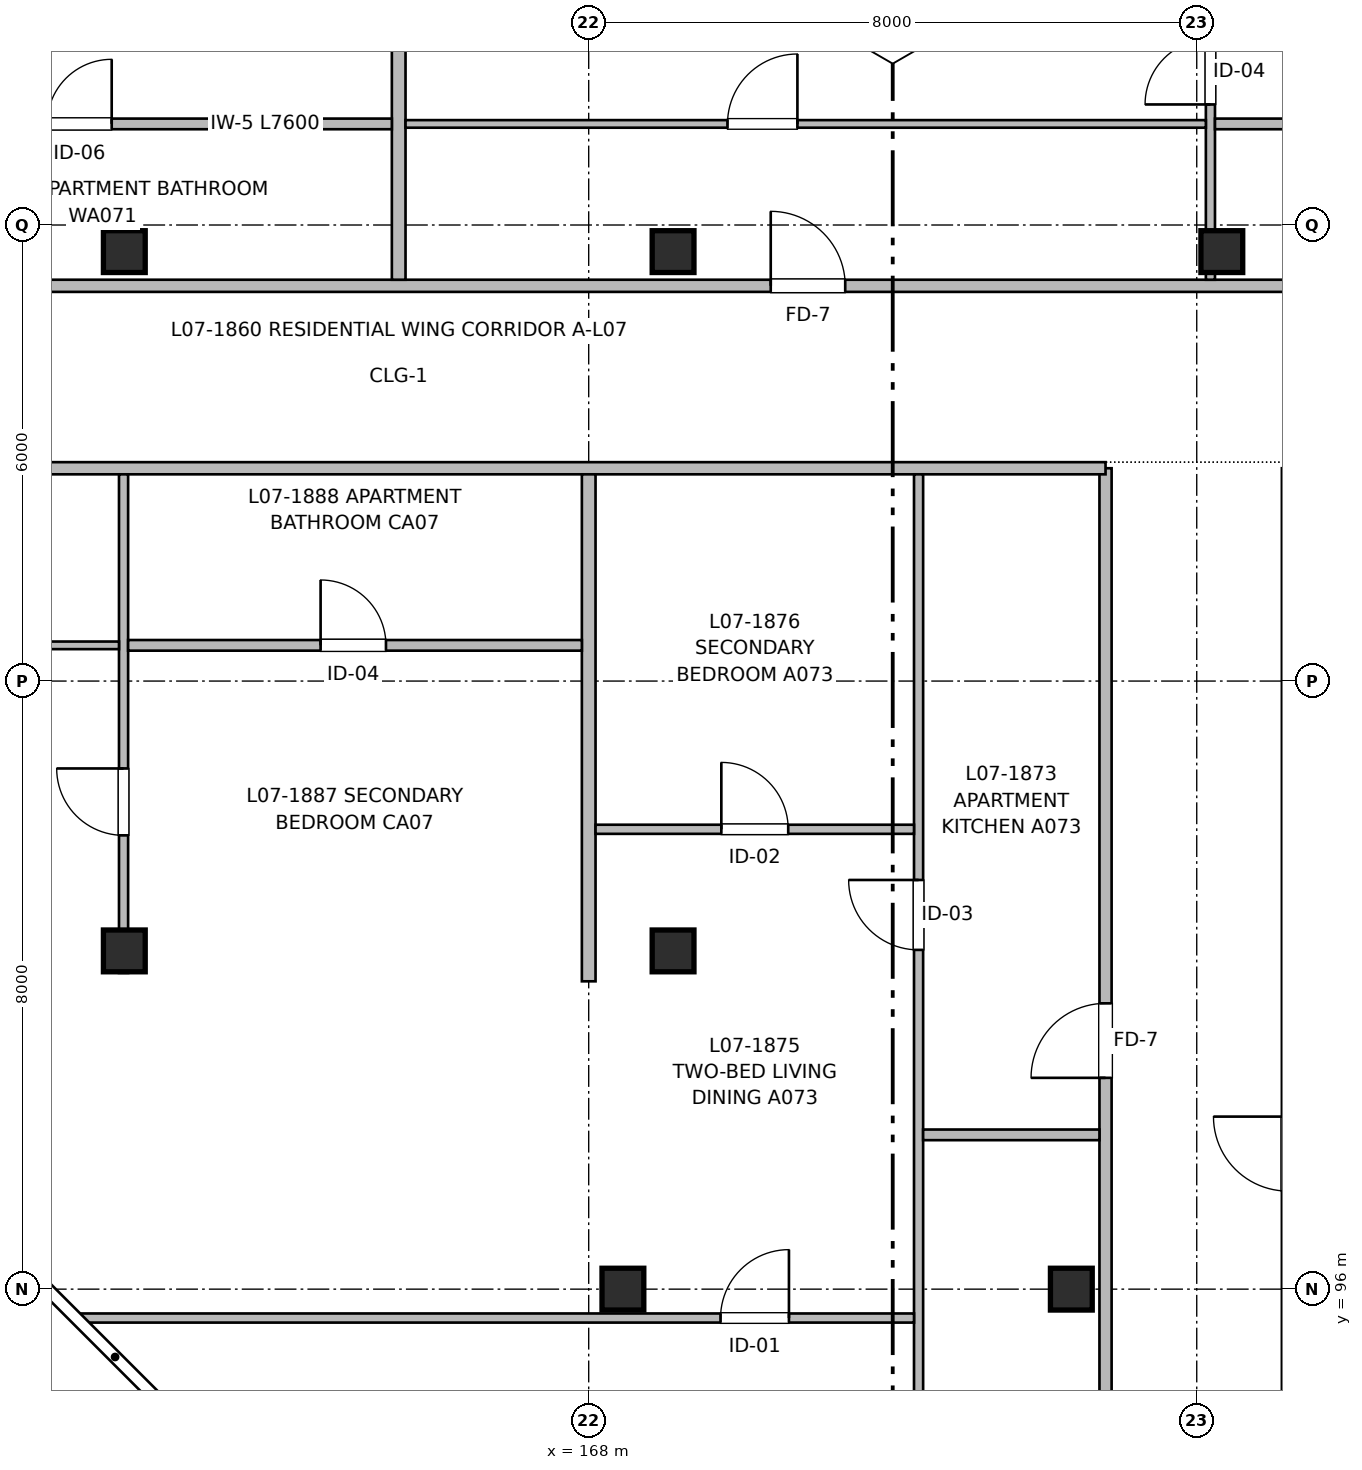
"""IFC4 building model, lengths in metres.
Left out: names, types, materials, properties, quantities, classifications, styles, units other than length and angle.
Written with IfcOpenShell. Run it as: python <this file> out.ifc"""

import sys

from ifc_helpers import new_model, si_unit, direction, frame, frame_2d, origin, origin_2d, place, context, subcontext, project, spatial, rectangle, extrude, element, fill, save


model = new_model("IFC4")
c1 = context("Model", 3, precision=1e-05, world=origin(), true_north=direction((0.0, 1.0)))
c2 = subcontext(c1, "Body", "Model", "MODEL_VIEW")
j1 = project(units=[si_unit("LENGTHUNIT", "METRE"), si_unit("PLANEANGLEUNIT", "RADIAN")], contexts=[c1])
p1 = place(None, origin())
s1 = spatial("IfcSite", under=j1, at=p1, CompositionType="ELEMENT")
p2 = place(p1, origin())
s2 = spatial("IfcBuilding", under=s1, at=p2, CompositionType="ELEMENT")
p3 = place(p2, frame((0.0, 0.0, 23.36)))
s3 = spatial("IfcBuildingStorey", under=s2, at=p3, CompositionType="ELEMENT", Elevation=23.36)
for number, where, z_axis, x_axis in (
    (1, (161.89, 100.45, 0.0), (0.0, 0.0, 1.0), (1.0, 0.0, 0.0)),
    (2, (161.89, 109.65, 0.0), (0.0, 0.0, 1.0), (1.0, 0.0, 0.0)),
    (3, (168.45, 96.0, 0.0), (0.0, 0.0, 1.0), (1.0, 0.0, 0.0)),
    (4, (169.11, 100.45, 0.0), (0.0, 0.0, 1.0), (1.0, 0.0, 0.0)),
    (5, (169.11, 109.65, 0.0), (0.0, 0.0, 1.0), (1.0, 0.0, 0.0)),
    (6, (174.35, 96.0, 0.0), (0.0, 0.0, 1.0), (1.0, 0.0, 0.0)),
    (7, (176.33, 109.65, 0.0), (0.0, 0.0, 1.0), (1.0, 0.0, 0.0)),
):
    element("IfcColumn", number, at=place(p3, frame(where, z_axis=z_axis, x_axis=x_axis)), inside=s3, PredefinedType="COLUMN", context=c2, shape_type="SweptSolid", body=[
        extrude(rectangle(XDim=0.55, YDim=0.55, at=origin_2d()), origin(), (0.0, 0.0, 1.0), 3.2),
    ])
p4 = place(p3, frame((174.8, 56.16, 0.0), z_axis=(0.0, 0.0, 1.0), x_axis=(0.0, 1.0, 0.0)))
e8 = element("IfcWall", 8, at=p4, inside=s3, PredefinedType="PARTITIONING", context=c2, shape_type="SweptSolid", body=[
    extrude(rectangle(XDim=50.64, YDim=0.16, at=frame_2d((25.32, 0.0))), origin(), (0.0, 0.0, 1.0), 2.935),
])
p5 = place(p4, frame((8.62, 0.0, 0.0)))
e9 = element("IfcOpeningElement", 9, at=p5, cuts=e8, PredefinedType="OPENING", context=c2, shape_type="SweptSolid", body=[
    extrude(rectangle(XDim=0.98, YDim=2.15, at=frame_2d((0.49, 1.075))), frame((0.0, 0.09, 0.0), z_axis=(0.0, -1.0, 0.0), x_axis=(1.0, 0.0, 0.0)), (0.0, 0.0, 1.0), 0.18),
])
p6 = place(p4, frame((25.85, 0.0, 0.0)))
e10 = element("IfcOpeningElement", 10, at=p6, cuts=e8, PredefinedType="OPENING", context=c2, shape_type="SweptSolid", body=[
    extrude(rectangle(XDim=1.02, YDim=2.15, at=frame_2d((0.51, 1.075))), frame((0.0, 0.09, 0.0), z_axis=(0.0, -1.0, 0.0), x_axis=(1.0, 0.0, 0.0)), (0.0, 0.0, 1.0), 0.18),
])
p7 = place(p4, frame((42.62, 0.0, 0.0)))
e11 = element("IfcOpeningElement", 11, at=p7, cuts=e8, PredefinedType="OPENING", context=c2, shape_type="SweptSolid", body=[
    extrude(rectangle(XDim=0.98, YDim=2.15, at=frame_2d((0.49, 1.075))), frame((0.0, 0.09, 0.0), z_axis=(0.0, -1.0, 0.0), x_axis=(1.0, 0.0, 0.0)), (0.0, 0.0, 1.0), 0.18),
])
p8 = place(p3, frame((177.2, 56.16, 0.0), z_axis=(0.0, 0.0, 1.0), x_axis=(0.0, 1.0, 0.0)))
e12 = element("IfcWall", 12, at=p8, inside=s3, PredefinedType="PARTITIONING", context=c2, shape_type="SweptSolid", body=[
    extrude(rectangle(XDim=50.64, YDim=0.16, at=frame_2d((25.32, 0.0))), origin(), (0.0, 0.0, 1.0), 2.935),
])
p9 = place(p8, frame((12.84, 0.0, 0.0)))
e13 = element("IfcOpeningElement", 13, at=p9, cuts=e12, PredefinedType="OPENING", context=c2, shape_type="SweptSolid", body=[
    extrude(rectangle(XDim=1.1, YDim=2.15, at=frame_2d((0.55, 1.075))), frame((0.0, 0.09, 0.0), z_axis=(0.0, -1.0, 0.0), x_axis=(1.0, 0.0, 0.0)), (0.0, 0.0, 1.0), 0.18),
])
p10 = place(p8, frame((19.24, 0.0, 0.0)))
e14 = element("IfcOpeningElement", 14, at=p10, cuts=e12, PredefinedType="OPENING", context=c2, shape_type="SweptSolid", body=[
    extrude(rectangle(XDim=1.6, YDim=2.15, at=frame_2d((0.8, 1.075))), frame((0.0, 0.09, 0.0), z_axis=(0.0, -1.0, 0.0), x_axis=(1.0, 0.0, 0.0)), (0.0, 0.0, 1.0), 0.18),
])
p11 = place(p8, frame((1.8, 0.0, 0.0)))
e15 = element("IfcOpeningElement", 15, at=p11, cuts=e12, PredefinedType="OPENING", context=c2, shape_type="SweptSolid", body=[
    extrude(rectangle(XDim=0.96, YDim=2.15, at=frame_2d((0.48, 1.075))), frame((0.0, 0.09, 0.0), z_axis=(0.0, -1.0, 0.0), x_axis=(1.0, 0.0, 0.0)), (0.0, 0.0, 1.0), 0.18),
])
p12 = place(p8, frame((32.87, 0.0, 0.0)))
e16 = element("IfcOpeningElement", 16, at=p12, cuts=e12, PredefinedType="OPENING", context=c2, shape_type="SweptSolid", body=[
    extrude(rectangle(XDim=0.98, YDim=2.15, at=frame_2d((0.49, 1.075))), frame((0.0, 0.09, 0.0), z_axis=(0.0, -1.0, 0.0), x_axis=(1.0, 0.0, 0.0)), (0.0, 0.0, 1.0), 0.18),
])
p13 = place(p8, frame((41.13, 0.0, 0.0)))
e17 = element("IfcOpeningElement", 17, at=p13, cuts=e12, PredefinedType="OPENING", context=c2, shape_type="SweptSolid", body=[
    extrude(rectangle(XDim=0.98, YDim=2.15, at=frame_2d((0.49, 1.075))), frame((0.0, 0.09, 0.0), z_axis=(0.0, -1.0, 0.0), x_axis=(1.0, 0.0, 0.0)), (0.0, 0.0, 1.0), 0.18),
])
p14 = place(p3, frame((147.16, 106.8, 0.0), z_axis=(0.0, 0.0, 1.0), x_axis=(1.0, 0.0, 0.0)))
e18 = element("IfcWall", 18, at=p14, inside=s3, PredefinedType="PARTITIONING", context=c2, shape_type="SweptSolid", body=[
    extrude(rectangle(XDim=27.64, YDim=0.16, at=frame_2d((13.82, 0.0))), origin(), (0.0, 0.0, 1.0), 2.935),
])
p15 = place(p14, frame((3.515, 0.0, 0.0)))
e19 = element("IfcOpeningElement", 19, at=p15, cuts=e18, PredefinedType="OPENING", context=c2, shape_type="SweptSolid", body=[
    extrude(rectangle(XDim=1.05, YDim=2.15, at=frame_2d((0.525, 1.075))), frame((0.0, 0.09, 0.0), z_axis=(0.0, -1.0, 0.0), x_axis=(1.0, 0.0, 0.0)), (0.0, 0.0, 1.0), 0.18),
])
p16 = place(p14, frame((10.69, 0.0, 0.0)))
e20 = element("IfcOpeningElement", 20, at=p16, cuts=e18, PredefinedType="OPENING", context=c2, shape_type="SweptSolid", body=[
    extrude(rectangle(XDim=0.98, YDim=2.15, at=frame_2d((0.49, 1.075))), frame((0.0, 0.09, 0.0), z_axis=(0.0, -1.0, 0.0), x_axis=(1.0, 0.0, 0.0)), (0.0, 0.0, 1.0), 0.18),
])
p17 = place(p3, frame((147.16, 109.2, 0.0), z_axis=(0.0, 0.0, 1.0), x_axis=(1.0, 0.0, 0.0)))
e21 = element("IfcWall", 21, at=p17, inside=s3, PredefinedType="PARTITIONING", context=c2, shape_type="SweptSolid", body=[
    extrude(rectangle(XDim=36.68, YDim=0.16, at=frame_2d((18.34, 0.0))), origin(), (0.0, 0.0, 1.0), 2.935),
])
p18 = place(p17, frame((4.805, 0.0, 0.0)))
e22 = element("IfcOpeningElement", 22, at=p18, cuts=e21, PredefinedType="OPENING", context=c2, shape_type="SweptSolid", body=[
    extrude(rectangle(XDim=0.98, YDim=2.15, at=frame_2d((0.49, 1.075))), frame((0.0, 0.09, 0.0), z_axis=(0.0, -1.0, 0.0), x_axis=(1.0, 0.0, 0.0)), (0.0, 0.0, 1.0), 0.18),
])
p19 = place(p17, frame((23.235, 0.0, 0.0)))
e23 = element("IfcOpeningElement", 23, at=p19, cuts=e21, PredefinedType="OPENING", context=c2, shape_type="SweptSolid", body=[
    extrude(rectangle(XDim=0.98, YDim=2.15, at=frame_2d((0.49, 1.075))), frame((0.0, 0.09, 0.0), z_axis=(0.0, -1.0, 0.0), x_axis=(1.0, 0.0, 0.0)), (0.0, 0.0, 1.0), 0.18),
])
p20 = place(p3, frame((168.0, 100.05, 0.0), z_axis=(0.0, 0.0, 1.0), x_axis=(0.0, 1.0, 0.0)))
e24 = element("IfcWall", 24, at=p20, inside=s3, PredefinedType="PARTITIONING", context=c2, shape_type="SweptSolid", body=[
    extrude(rectangle(XDim=6.67, YDim=0.18, at=frame_2d((3.335, 0.0))), origin(), (0.0, 0.0, 1.0), 2.935),
])
p21 = place(p3, frame((172.34, 90.63, 0.0), z_axis=(0.0, 0.0, 1.0), x_axis=(0.0, 1.0, 0.0)))
e25 = element("IfcWall", 25, at=p21, inside=s3, PredefinedType="PARTITIONING", context=c2, shape_type="SweptSolid", body=[
    extrude(rectangle(XDim=16.09, YDim=0.12, at=frame_2d((8.045, 0.0))), origin(), (0.0, 0.0, 1.0), 2.935),
])
p22 = place(p21, frame((2.812, 0.0, 0.0)))
e26 = element("IfcOpeningElement", 26, at=p22, cuts=e25, PredefinedType="OPENING", context=c2, shape_type="SweptSolid", body=[
    extrude(rectangle(XDim=0.86, YDim=2.1, at=frame_2d((0.43, 1.05))), frame((0.0, 0.07, 0.0), z_axis=(0.0, -1.0, 0.0), x_axis=(1.0, 0.0, 0.0)), (0.0, 0.0, 1.0), 0.14),
])
p23 = place(p21, frame((9.833, 0.0, 0.0)))
e27 = element("IfcOpeningElement", 27, at=p23, cuts=e25, PredefinedType="OPENING", context=c2, shape_type="SweptSolid", body=[
    extrude(rectangle(XDim=0.92, YDim=2.1, at=frame_2d((0.46, 1.05))), frame((0.0, 0.07, 0.0), z_axis=(0.0, -1.0, 0.0), x_axis=(1.0, 0.0, 0.0)), (0.0, 0.0, 1.0), 0.14),
])
p24 = place(p3, frame((172.4, 98.03, 0.0), z_axis=(0.0, 0.0, 1.0), x_axis=(1.0, 0.0, 0.0)))
e28 = element("IfcWall", 28, at=p24, inside=s3, PredefinedType="PARTITIONING", context=c2, shape_type="SweptSolid", body=[
    extrude(rectangle(XDim=2.32, YDim=0.14, at=frame_2d((1.16, 0.0))), origin(), (0.0, 0.0, 1.0), 2.935),
])
p25 = place(p3, frame((161.312, 95.62, 0.0), z_axis=(0.0, 0.0, 1.0), x_axis=(1.0, 0.0, 0.0)))
e29 = element("IfcWall", 29, at=p25, inside=s3, PredefinedType="PARTITIONING", context=c2, shape_type="SweptSolid", body=[
    extrude(rectangle(XDim=10.968, YDim=0.12, at=frame_2d((5.484, 0.0))), origin(), (0.0, 0.0, 1.0), 2.935),
])
p26 = place(p25, frame((8.422, 0.0, 0.0)))
e30 = element("IfcOpeningElement", 30, at=p26, cuts=e29, PredefinedType="OPENING", context=c2, shape_type="SweptSolid", body=[
    extrude(rectangle(XDim=0.9, YDim=2.1, at=frame_2d((0.45, 1.05))), frame((0.0, 0.07, 0.0), z_axis=(0.0, -1.0, 0.0), x_axis=(1.0, 0.0, 0.0)), (0.0, 0.0, 1.0), 0.14),
])
p27 = place(p3, frame((168.09, 102.05, 0.0), z_axis=(0.0, 0.0, 1.0), x_axis=(1.0, 0.0, 0.0)))
e31 = element("IfcWall", 31, at=p27, inside=s3, PredefinedType="PARTITIONING", context=c2, shape_type="SweptSolid", body=[
    extrude(rectangle(XDim=4.19, YDim=0.12, at=frame_2d((2.095, 0.0))), origin(), (0.0, 0.0, 1.0), 2.935),
])
p28 = place(p27, frame((1.655, 0.0, 0.0)))
e32 = element("IfcOpeningElement", 32, at=p28, cuts=e31, PredefinedType="OPENING", context=c2, shape_type="SweptSolid", body=[
    extrude(rectangle(XDim=0.88, YDim=2.1, at=frame_2d((0.44, 1.05))), frame((0.0, 0.07, 0.0), z_axis=(0.0, -1.0, 0.0), x_axis=(1.0, 0.0, 0.0)), (0.0, 0.0, 1.0), 0.14),
])
p29 = place(p3, frame((165.5, 109.28, 0.0), z_axis=(0.0, 0.0, 1.0), x_axis=(0.0, 1.0, 0.0)))
e33 = element("IfcWall", 33, at=p29, inside=s3, PredefinedType="PARTITIONING", context=c2, shape_type="SweptSolid", body=[
    extrude(rectangle(XDim=6.59, YDim=0.18, at=frame_2d((3.295, 0.0))), origin(), (0.0, 0.0, 1.0), 2.935),
])
p30 = place(p3, frame((157.81, 111.33, 0.0), z_axis=(0.0, 0.0, 1.0), x_axis=(1.0, 0.0, 0.0)))
e34 = element("IfcWall", 34, at=p30, inside=s3, PredefinedType="PARTITIONING", context=c2, shape_type="SweptSolid", body=[
    extrude(rectangle(XDim=7.6, YDim=0.14, at=frame_2d((3.8, 0.0))), origin(), (0.0, 0.0, 1.0), 2.935),
])
p31 = place(p30, frame((3.064, 0.0, 0.0)))
e35 = element("IfcOpeningElement", 35, at=p31, cuts=e34, PredefinedType="OPENING", context=c2, shape_type="SweptSolid", body=[
    extrude(rectangle(XDim=0.85, YDim=2.05, at=frame_2d((0.425, 1.025))), frame((0.0, 0.08, 0.0), z_axis=(0.0, -1.0, 0.0), x_axis=(1.0, 0.0, 0.0)), (0.0, 0.0, 1.0), 0.16),
])
p32 = place(p3, frame((176.18, 109.28, 0.0), z_axis=(0.0, 0.0, 1.0), x_axis=(0.0, 1.0, 0.0)))
e36 = element("IfcWall", 36, at=p32, inside=s3, PredefinedType="PARTITIONING", context=c2, shape_type="SweptSolid", body=[
    extrude(rectangle(XDim=6.59, YDim=0.12, at=frame_2d((3.295, 0.0))), origin(), (0.0, 0.0, 1.0), 2.58),
])
p33 = place(p32, frame((2.306, 0.0, 0.0)))
e37 = element("IfcOpeningElement", 37, at=p33, cuts=e36, PredefinedType="OPENING", context=c2, shape_type="SweptSolid", body=[
    extrude(rectangle(XDim=0.86, YDim=2.1, at=frame_2d((0.43, 1.05))), frame((0.0, 0.07, 0.0), z_axis=(0.0, -1.0, 0.0), x_axis=(1.0, 0.0, 0.0)), (0.0, 0.0, 1.0), 0.14),
])
p34 = place(p32, frame((4.093, 0.0, 0.0)))
e38 = element("IfcOpeningElement", 38, at=p34, cuts=e36, PredefinedType="OPENING", context=c2, shape_type="SweptSolid", body=[
    extrude(rectangle(XDim=0.9, YDim=2.1, at=frame_2d((0.45, 1.05))), frame((0.0, 0.07, 0.0), z_axis=(0.0, -1.0, 0.0), x_axis=(1.0, 0.0, 0.0)), (0.0, 0.0, 1.0), 0.14),
])
p35 = place(p3, frame((176.24, 111.33, 0.0), z_axis=(0.0, 0.0, 1.0), x_axis=(1.0, 0.0, 0.0)))
e39 = element("IfcWall", 39, at=p35, inside=s3, PredefinedType="PARTITIONING", context=c2, shape_type="SweptSolid", body=[
    extrude(rectangle(XDim=7.6, YDim=0.14, at=frame_2d((3.8, 0.0))), origin(), (0.0, 0.0, 1.0), 2.935),
])
p36 = place(p35, frame((3.064, 0.0, 0.0)))
e40 = element("IfcOpeningElement", 40, at=p36, cuts=e39, PredefinedType="OPENING", context=c2, shape_type="SweptSolid", body=[
    extrude(rectangle(XDim=0.85, YDim=2.05, at=frame_2d((0.425, 1.025))), frame((0.0, 0.08, 0.0), z_axis=(0.0, -1.0, 0.0), x_axis=(1.0, 0.0, 0.0)), (0.0, 0.0, 1.0), 0.16),
])
p37 = place(p3, frame((165.59, 111.33, 0.0), z_axis=(0.0, 0.0, 1.0), x_axis=(1.0, 0.0, 0.0)))
e41 = element("IfcWall", 41, at=p37, inside=s3, PredefinedType="PARTITIONING", context=c2, shape_type="SweptSolid", body=[
    extrude(rectangle(XDim=10.53, YDim=0.1, at=frame_2d((5.265, 0.0))), origin(), (0.0, 0.0, 1.0), 2.935),
])
p38 = place(p37, frame((4.236, 0.0, 0.0)))
e42 = element("IfcOpeningElement", 42, at=p38, cuts=e41, PredefinedType="OPENING", context=c2, shape_type="SweptSolid", body=[
    extrude(rectangle(XDim=0.92, YDim=2.1, at=frame_2d((0.46, 1.05))), frame((0.0, 0.06, 0.0), z_axis=(0.0, -1.0, 0.0), x_axis=(1.0, 0.0, 0.0)), (0.0, 0.0, 1.0), 0.12),
])
p39 = place(p3, frame((161.88, 100.16, 0.0), z_axis=(0.0, 0.0, 1.0), x_axis=(0.0, 1.0, 0.0)))
e43 = element("IfcWall", 43, at=p39, inside=s3, PredefinedType="PARTITIONING", context=c2, shape_type="SweptSolid", body=[
    extrude(rectangle(XDim=6.56, YDim=0.12, at=frame_2d((3.28, 0.0))), origin(), (0.0, 0.0, 1.0), 2.68),
])
p40 = place(p39, frame((1.81, 0.0, 0.0)))
e44 = element("IfcOpeningElement", 44, at=p40, cuts=e43, PredefinedType="OPENING", context=c2, shape_type="SweptSolid", body=[
    extrude(rectangle(XDim=0.88, YDim=2.1, at=frame_2d((0.44, 1.05))), frame((0.0, 0.07, 0.0), z_axis=(0.0, -1.0, 0.0), x_axis=(1.0, 0.0, 0.0)), (0.0, 0.0, 1.0), 0.14),
])
p41 = place(p3, frame((161.94, 104.47, 0.0), z_axis=(0.0, 0.0, 1.0), x_axis=(1.0, 0.0, 0.0)))
e45 = element("IfcWall", 45, at=p41, inside=s3, PredefinedType="PARTITIONING", context=c2, shape_type="SweptSolid", body=[
    extrude(rectangle(XDim=5.97, YDim=0.14, at=frame_2d((2.985, 0.0))), origin(), (0.0, 0.0, 1.0), 2.935),
])
p42 = place(p41, frame((2.533, 0.0, 0.0)))
e46 = element("IfcOpeningElement", 46, at=p42, cuts=e45, PredefinedType="OPENING", context=c2, shape_type="SweptSolid", body=[
    extrude(rectangle(XDim=0.86, YDim=2.1, at=frame_2d((0.43, 1.05))), frame((0.0, 0.08, 0.0), z_axis=(0.0, -1.0, 0.0), x_axis=(1.0, 0.0, 0.0)), (0.0, 0.0, 1.0), 0.16),
])
p43 = place(p3, frame((154.8, 104.47, 0.0), z_axis=(0.0, 0.0, 1.0), x_axis=(1.0, 0.0, 0.0)))
e47 = element("IfcWall", 47, at=p43, inside=s3, PredefinedType="PARTITIONING", context=c2, shape_type="SweptSolid", body=[
    extrude(rectangle(XDim=7.02, YDim=0.1, at=frame_2d((3.51, 0.0))), origin(), (0.0, 0.0, 1.0), 2.935),
])
p44 = place(p43, frame((2.974, 0.0, 0.0)))
e48 = element("IfcOpeningElement", 48, at=p44, cuts=e47, PredefinedType="OPENING", context=c2, shape_type="SweptSolid", body=[
    extrude(rectangle(XDim=0.92, YDim=2.1, at=frame_2d((0.46, 1.05))), frame((0.0, 0.06, 0.0), z_axis=(0.0, -1.0, 0.0), x_axis=(1.0, 0.0, 0.0)), (0.0, 0.0, 1.0), 0.12),
])
p45 = place(p23, origin())
e49 = element("IfcDoor", 49, at=p45, inside=s3, OperationType="SINGLE_SWING_RIGHT", PredefinedType="DOOR", context=c2, shape_type="SweptSolid", body=[
    extrude(rectangle(XDim=0.92, YDim=2.1, at=frame_2d((0.46, 1.05))), frame((0.0, 0.025, 0.0), z_axis=(0.0, -1.0, 0.0), x_axis=(1.0, 0.0, 0.0)), (0.0, 0.0, 1.0), 0.05),
])
fill(e27, e49)
p46 = place(p7, origin())
e50 = element("IfcDoor", 50, at=p46, inside=s3, OperationType="SINGLE_SWING_LEFT", PredefinedType="DOOR", context=c2, shape_type="SweptSolid", body=[
    extrude(rectangle(XDim=0.98, YDim=2.15, at=frame_2d((0.49, 1.075))), frame((0.0, 0.025, 0.0), z_axis=(0.0, -1.0, 0.0), x_axis=(1.0, 0.0, 0.0)), (0.0, 0.0, 1.0), 0.05),
])
fill(e11, e50)
p47 = place(p26, origin())
e51 = element("IfcDoor", 51, at=p47, inside=s3, OperationType="SINGLE_SWING_RIGHT", PredefinedType="DOOR", context=c2, shape_type="SweptSolid", body=[
    extrude(rectangle(XDim=0.9, YDim=2.1, at=frame_2d((0.45, 1.05))), frame((0.0, 0.025, 0.0), z_axis=(0.0, -1.0, 0.0), x_axis=(1.0, 0.0, 0.0)), (0.0, 0.0, 1.0), 0.05),
])
fill(e30, e51)
p48 = place(p28, origin())
e52 = element("IfcDoor", 52, at=p48, inside=s3, OperationType="SINGLE_SWING_LEFT", PredefinedType="DOOR", context=c2, shape_type="SweptSolid", body=[
    extrude(rectangle(XDim=0.88, YDim=2.1, at=frame_2d((0.44, 1.05))), frame((0.0, 0.025, 0.0), z_axis=(0.0, -1.0, 0.0), x_axis=(1.0, 0.0, 0.0)), (0.0, 0.0, 1.0), 0.05),
])
fill(e32, e52)
p49 = place(p31, origin())
e53 = element("IfcDoor", 53, at=p49, inside=s3, OperationType="SINGLE_SWING_RIGHT", PredefinedType="DOOR", context=c2, shape_type="SweptSolid", body=[
    extrude(rectangle(XDim=0.85, YDim=2.05, at=frame_2d((0.425, 1.025))), frame((0.0, 0.025, 0.0), z_axis=(0.0, -1.0, 0.0), x_axis=(1.0, 0.0, 0.0)), (0.0, 0.0, 1.0), 0.05),
])
fill(e35, e53)
p50 = place(p19, origin())
e54 = element("IfcDoor", 54, at=p50, inside=s3, OperationType="SINGLE_SWING_LEFT", PredefinedType="DOOR", context=c2, shape_type="SweptSolid", body=[
    extrude(rectangle(XDim=0.98, YDim=2.15, at=frame_2d((0.49, 1.075))), frame((0.0, 0.025, 0.0), z_axis=(0.0, -1.0, 0.0), x_axis=(1.0, 0.0, 0.0)), (0.0, 0.0, 1.0), 0.05),
])
fill(e23, e54)
p51 = place(p38, origin())
e55 = element("IfcDoor", 55, at=p51, inside=s3, OperationType="SINGLE_SWING_RIGHT", PredefinedType="DOOR", context=c2, shape_type="SweptSolid", body=[
    extrude(rectangle(XDim=0.92, YDim=2.1, at=frame_2d((0.46, 1.05))), frame((0.0, 0.025, 0.0), z_axis=(0.0, -1.0, 0.0), x_axis=(1.0, 0.0, 0.0)), (0.0, 0.0, 1.0), 0.05),
])
fill(e42, e55)
p52 = place(p33, origin())
e56 = element("IfcDoor", 56, at=p52, inside=s3, OperationType="SINGLE_SWING_LEFT", PredefinedType="DOOR", context=c2, shape_type="SweptSolid", body=[
    extrude(rectangle(XDim=0.86, YDim=2.1, at=frame_2d((0.43, 1.05))), frame((0.0, 0.025, 0.0), z_axis=(0.0, -1.0, 0.0), x_axis=(1.0, 0.0, 0.0)), (0.0, 0.0, 1.0), 0.05),
])
fill(e37, e56)
p53 = place(p40, origin())
e57 = element("IfcDoor", 57, at=p53, inside=s3, OperationType="SINGLE_SWING_RIGHT", PredefinedType="DOOR", context=c2, shape_type="SweptSolid", body=[
    extrude(rectangle(XDim=0.88, YDim=2.1, at=frame_2d((0.44, 1.05))), frame((0.0, 0.025, 0.0), z_axis=(0.0, -1.0, 0.0), x_axis=(1.0, 0.0, 0.0)), (0.0, 0.0, 1.0), 0.05),
])
fill(e44, e57)
p54 = place(p42, origin())
e58 = element("IfcDoor", 58, at=p54, inside=s3, OperationType="SINGLE_SWING_LEFT", PredefinedType="DOOR", context=c2, shape_type="SweptSolid", body=[
    extrude(rectangle(XDim=0.86, YDim=2.1, at=frame_2d((0.43, 1.05))), frame((0.0, 0.025, 0.0), z_axis=(0.0, -1.0, 0.0), x_axis=(1.0, 0.0, 0.0)), (0.0, 0.0, 1.0), 0.05),
])
fill(e46, e58)
save(model, sys.argv[1])
